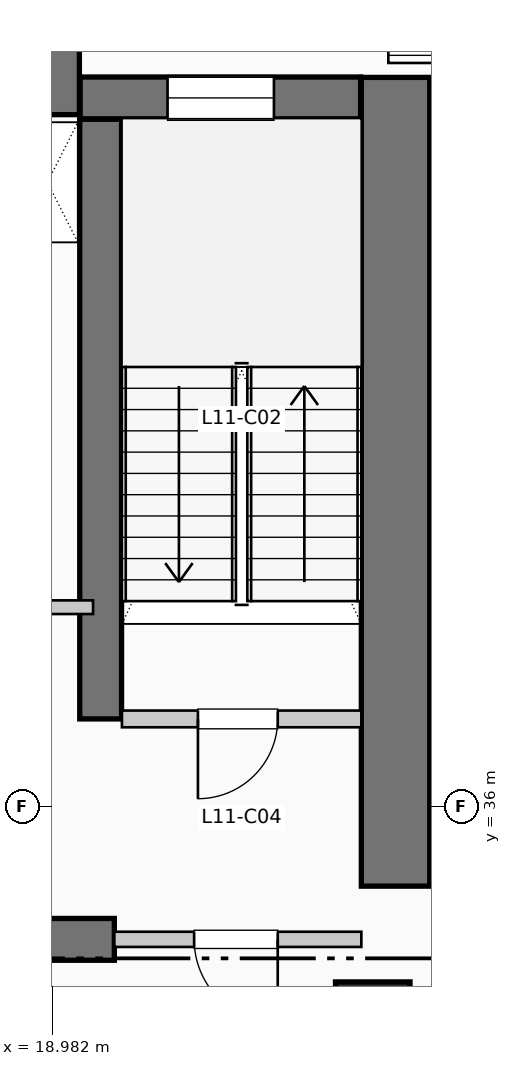
"""IFC4 building model, lengths in metres.
Left out: names, types, materials, properties, quantities, classifications, styles, units other than length and angle.
Written with IfcOpenShell. Run it as: python <this file> out.ifc"""

import sys

from ifc_helpers import new_model, si_unit, direction, frame, frame_2d, origin, origin_2d, place, context, subcontext, project, spatial, rectangle, extrude, element, fill, save


model = new_model("IFC4")
c1 = context("Model", 3, precision=1e-05, world=origin(), true_north=direction((0.0, 1.0)))
c2 = subcontext(c1, "Body", "Model", "MODEL_VIEW")
j1 = project(units=[si_unit("LENGTHUNIT", "METRE"), si_unit("PLANEANGLEUNIT", "RADIAN")], contexts=[c1])
p1 = place(None, origin())
s1 = spatial("IfcSite", under=j1, at=p1, CompositionType="ELEMENT")
p2 = place(p1, origin())
s2 = spatial("IfcBuilding", under=s1, at=p2, CompositionType="ELEMENT")
p3 = place(p2, frame((0.0, 0.0, 50.16)))
s3 = spatial("IfcBuildingStorey", under=s2, at=p3, CompositionType="ELEMENT", Elevation=50.16)
p4 = place(p3, frame((5.36, 45.55, 0.0), z_axis=(0.0, 0.0, 1.0), x_axis=(1.0, 0.0, 0.0)))
e1 = element("IfcWall", 1, at=p4, inside=s3, PredefinedType="SHEAR", context=c2, shape_type="SweptSolid", body=[
    extrude(rectangle(XDim=13.98, YDim=0.9, at=frame_2d((6.99, 0.0))), origin(), (0.0, 0.0, 1.0), 3.96),
])
p5 = place(p3, frame((23.5, 34.95, 0.0), z_axis=(0.0, 0.0, 1.0), x_axis=(0.0, 1.0, 0.0)))
e2 = element("IfcWall", 2, at=p5, inside=s3, PredefinedType="SHEAR", context=c2, shape_type="SweptSolid", body=[
    extrude(rectangle(XDim=10.64, YDim=0.9, at=frame_2d((5.32, 0.0))), origin(), (0.0, 0.0, 1.0), 3.96),
])
p6 = place(p3, frame((13.68, 34.25, 0.0), z_axis=(0.0, 0.0, 1.0), x_axis=(1.0, 0.0, 0.0)))
e3 = element("IfcWall", 3, at=p6, inside=s3, PredefinedType="SHEAR", context=c2, shape_type="SweptSolid", body=[
    extrude(rectangle(XDim=6.12, YDim=0.55, at=frame_2d((3.06, 0.0))), origin(), (0.0, 0.0, 1.0), 3.96),
])
p7 = place(p3, frame((19.62, 37.15, 0.0), z_axis=(0.0, 0.0, 1.0), x_axis=(0.0, 1.0, 0.0)))
e4 = element("IfcWall", 4, at=p7, inside=s3, PredefinedType="SHEAR", context=c2, shape_type="SweptSolid", body=[
    extrude(rectangle(XDim=7.89, YDim=0.55, at=frame_2d((3.945, 0.0))), origin(), (0.0, 0.0, 1.0), 3.96),
])
p8 = place(p3, frame((19.35, 45.32, 0.0), z_axis=(0.0, 0.0, 1.0), x_axis=(1.0, 0.0, 0.0)))
e5 = element("IfcWall", 5, at=p8, inside=s3, PredefinedType="SHEAR", context=c2, shape_type="SweptSolid", body=[
    extrude(rectangle(XDim=3.69, YDim=0.55, at=frame_2d((1.845, 0.0))), origin(), (0.0, 0.0, 1.0), 3.96),
])
p9 = place(p8, frame((1.15, 0.0, 1.05)))
e6 = element("IfcOpeningElement", 6, at=p9, cuts=e5, PredefinedType="OPENING", context=c2, shape_type="SweptSolid", body=[
    extrude(rectangle(XDim=1.4, YDim=1.8, at=frame_2d((0.7, 0.9))), frame((0.0, 0.285, 0.0), z_axis=(0.0, -1.0, 0.0), x_axis=(1.0, 0.0, 0.0)), (0.0, 0.0, 1.0), 0.57),
])
p10 = place(p3, frame((23.2, 33.2, 0.0), z_axis=(0.0, 0.0, 1.0), x_axis=(1.0, 0.0, 0.0)))
e7 = element("IfcColumn", 7, at=p10, inside=s3, PredefinedType="COLUMN", context=c2, shape_type="SweptSolid", body=[
    extrude(rectangle(XDim=0.98, YDim=0.98, at=origin_2d()), origin(), (0.0, 0.0, 1.0), 3.96),
])
p11 = place(p3, frame((19.9, 37.15, 0.0), z_axis=(0.0, 0.0, 1.0), x_axis=(1.0, 0.0, 0.0)))
e8 = element("IfcWall", 8, at=p11, inside=s3, PredefinedType="PARTITIONING", context=c2, shape_type="SweptSolid", body=[
    extrude(rectangle(XDim=3.15, YDim=0.22, at=frame_2d((1.575, 0.0))), origin(), (0.0, 0.0, 1.0), 3.71),
])
p12 = place(p11, frame((2.05, 0.0, 0.0), z_axis=(0.0, 0.0, 1.0), x_axis=(-1.0, 0.0, 0.0)))
e9 = element("IfcOpeningElement", 9, at=p12, cuts=e8, PredefinedType="OPENING", context=c2, shape_type="SweptSolid", body=[
    extrude(rectangle(XDim=1.05, YDim=2.15, at=frame_2d((0.525, 1.075))), frame((0.0, 0.12, 0.0), z_axis=(0.0, -1.0, 0.0), x_axis=(1.0, 0.0, 0.0)), (0.0, 0.0, 1.0), 0.24),
])
p13 = place(p3, frame((19.8, 34.25, 0.0), z_axis=(0.0, 0.0, 1.0), x_axis=(1.0, 0.0, 0.0)))
e10 = element("IfcWall", 10, at=p13, inside=s3, PredefinedType="PARTITIONING", context=c2, shape_type="SweptSolid", body=[
    extrude(rectangle(XDim=3.25, YDim=0.2, at=frame_2d((1.625, 0.0))), origin(), (0.0, 0.0, 1.0), 3.71),
])
p14 = place(p13, frame((2.15, 0.0, 0.0), z_axis=(0.0, 0.0, 1.0), x_axis=(-1.0, 0.0, 0.0)))
e11 = element("IfcOpeningElement", 11, at=p14, cuts=e10, PredefinedType="OPENING", context=c2, shape_type="SweptSolid", body=[
    extrude(rectangle(XDim=1.1, YDim=2.15, at=frame_2d((0.55, 1.075))), frame((0.0, 0.11, 0.0), z_axis=(0.0, -1.0, 0.0), x_axis=(1.0, 0.0, 0.0)), (0.0, 0.0, 1.0), 0.22),
])
p15 = place(p3, frame((17.68, 38.62, 0.0), z_axis=(0.0, 0.0, 1.0), x_axis=(1.0, 0.0, 0.0)))
e12 = element("IfcWall", 12, at=p15, inside=s3, PredefinedType="PARTITIONING", context=c2, shape_type="SweptSolid", body=[
    extrude(rectangle(XDim=1.84, YDim=0.18, at=frame_2d((0.92, 0.0))), origin(), (0.0, 0.0, 1.0), 3.71),
])
p16 = place(p15, frame((0.24, 0.0, 0.0)))
e13 = element("IfcOpeningElement", 13, at=p16, cuts=e12, PredefinedType="OPENING", context=c2, shape_type="SweptSolid", body=[
    extrude(rectangle(XDim=0.92, YDim=2.1, at=frame_2d((0.46, 1.05))), frame((0.0, 0.1, 0.0), z_axis=(0.0, -1.0, 0.0), x_axis=(1.0, 0.0, 0.0)), (0.0, 0.0, 1.0), 0.2),
])
p17 = place(p9, origin())
e14 = element("IfcWindow", 14, at=p17, inside=s3, PartitioningType="SINGLE_PANEL", PredefinedType="WINDOW", context=c2, shape_type="SweptSolid", body=[
    extrude(rectangle(XDim=1.4, YDim=1.8, at=frame_2d((0.7, 0.9))), frame((0.0, 0.03, 0.0), z_axis=(0.0, -1.0, 0.0), x_axis=(1.0, 0.0, 0.0)), (0.0, 0.0, 1.0), 0.06),
])
fill(e6, e14)
p18 = place(p12, origin())
e15 = element("IfcDoor", 15, at=p18, inside=s3, OperationType="SINGLE_SWING_LEFT", PredefinedType="DOOR", context=c2, shape_type="SweptSolid", body=[
    extrude(rectangle(XDim=1.05, YDim=2.15, at=frame_2d((0.525, 1.075))), frame((0.0, 0.025, 0.0), z_axis=(0.0, -1.0, 0.0), x_axis=(1.0, 0.0, 0.0)), (0.0, 0.0, 1.0), 0.05),
])
fill(e9, e15)
p19 = place(p14, origin())
e16 = element("IfcDoor", 16, at=p19, inside=s3, OperationType="SINGLE_SWING_RIGHT", PredefinedType="DOOR", context=c2, shape_type="SweptSolid", body=[
    extrude(rectangle(XDim=1.1, YDim=2.15, at=frame_2d((0.55, 1.075))), frame((0.0, 0.025, 0.0), z_axis=(0.0, -1.0, 0.0), x_axis=(1.0, 0.0, 0.0)), (0.0, 0.0, 1.0), 0.05),
])
fill(e11, e16)
save(model, sys.argv[1])
